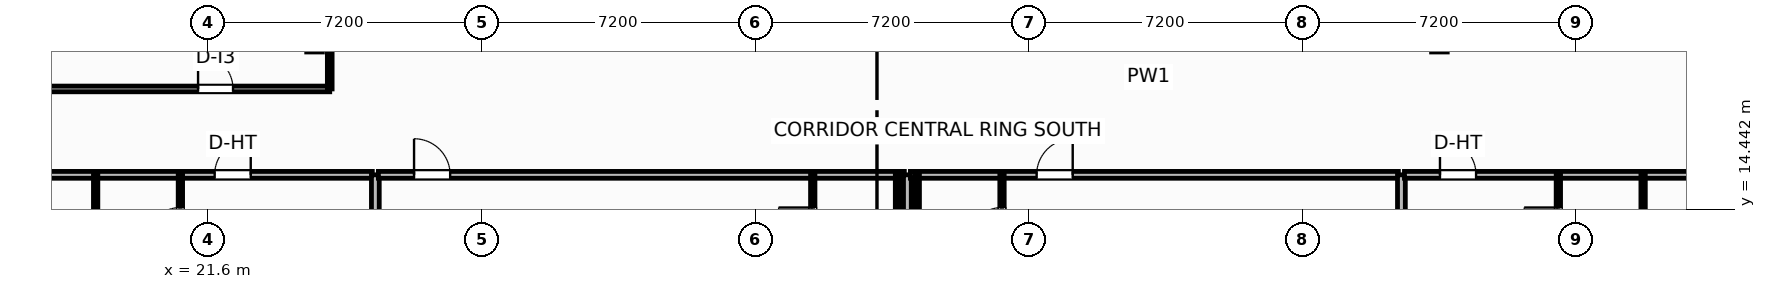
"""IFC4 building model, lengths in metres.
Left out: names, types, materials, properties, quantities, classifications, styles, units other than length and angle.
Written with IfcOpenShell. Run it as: python <this file> out.ifc"""

import sys

from ifc_helpers import new_model, si_unit, direction, frame, frame_2d, origin, place, context, subcontext, project, spatial, rectangle, extrude, element, fill, save


model = new_model("IFC4")
c1 = context("Model", 3, precision=1e-05, world=origin(), true_north=direction((0.0, 1.0)))
c2 = subcontext(c1, "Body", "Model", "MODEL_VIEW")
j1 = project(units=[si_unit("LENGTHUNIT", "METRE"), si_unit("PLANEANGLEUNIT", "RADIAN")], contexts=[c1])
p1 = place(None, origin())
s1 = spatial("IfcSite", under=j1, at=p1, CompositionType="ELEMENT")
p2 = place(p1, origin())
s2 = spatial("IfcBuilding", under=s1, at=p2, CompositionType="ELEMENT")
p3 = place(p2, frame((0.0, 0.0, 246.0)))
s3 = spatial("IfcBuildingStorey", under=s2, at=p3, CompositionType="ELEMENT", Elevation=246.0)
p4 = place(p3, frame((56.219, 9.845, 0.0), z_axis=(0.0, 0.0, 1.0), x_axis=(0.935225601791, 0.354052360188, 0.0)))
e1 = element("IfcWall", 1, at=p4, inside=s3, PredefinedType="SOLIDWALL", context=c2, shape_type="SweptSolid", body=[
    extrude(rectangle(XDim=17.647, YDim=0.22, at=frame_2d((8.824, 0.0))), origin(), (0.0, 0.0, 1.0), 2.73),
])
p5 = place(p4, frame((7.774, 0.0, 0.8)))
e2 = element("IfcOpeningElement", 2, at=p5, cuts=e1, PredefinedType="OPENING", context=c2, shape_type="SweptSolid", body=[
    extrude(rectangle(XDim=2.1, YDim=1.75, at=frame_2d((1.05, 0.875))), frame((0.0, 0.12, 0.0), z_axis=(0.0, -1.0, 0.0), x_axis=(1.0, 0.0, 0.0)), (0.0, 0.0, 1.0), 0.24),
])
p6 = place(p3, frame((6.908, 17.61, 0.0), z_axis=(0.0, 0.0, 1.0), x_axis=(1.0, 0.0, 0.0)))
e3 = element("IfcWall", 3, at=p6, inside=s3, PredefinedType="PARTITIONING", context=c2, shape_type="SweptSolid", body=[
    extrude(rectangle(XDim=17.892, YDim=0.15, at=frame_2d((8.946, 0.0))), origin(), (0.0, 0.0, 1.0), 3.45),
])
p7 = place(p6, frame((14.427, 0.0, 0.0)))
e4 = element("IfcOpeningElement", 4, at=p7, cuts=e3, PredefinedType="OPENING", context=c2, shape_type="SweptSolid", body=[
    extrude(rectangle(XDim=0.92, YDim=2.05, at=frame_2d((0.46, 1.025))), frame((0.0, 0.085, 0.0), z_axis=(0.0, -1.0, 0.0), x_axis=(1.0, 0.0, 0.0)), (0.0, 0.0, 1.0), 0.17),
])
p8 = place(p3, frame((24.8, 17.61, 0.0), z_axis=(0.0, 0.0, 1.0), x_axis=(0.0, 1.0, 0.0)))
e5 = element("IfcWall", 5, at=p8, inside=s3, PredefinedType="PARTITIONING", context=c2, shape_type="SweptSolid", body=[
    extrude(rectangle(XDim=1.63, YDim=0.125, at=frame_2d((0.815, 0.0))), origin(), (0.0, 0.0, 1.0), 2.739),
])
p9 = place(p3, frame((7.764, 15.35, 0.0), z_axis=(0.0, 0.0, 1.0), x_axis=(1.0, 0.0, 0.0)))
e6 = element("IfcWall", 6, at=p9, inside=s3, PredefinedType="PARTITIONING", context=c2, shape_type="SweptSolid", body=[
    extrude(rectangle(XDim=18.156, YDim=0.18, at=frame_2d((9.078, 0.0))), origin(), (0.0, 0.0, 1.0), 3.45),
])
p10 = place(p9, frame((14.007, 0.0, 0.0)))
e7 = element("IfcOpeningElement", 7, at=p10, cuts=e6, PredefinedType="OPENING", context=c2, shape_type="SweptSolid", body=[
    extrude(rectangle(XDim=0.95, YDim=2.15, at=frame_2d((0.475, 1.075))), frame((0.0, 0.1, 0.0), z_axis=(0.0, -1.0, 0.0), x_axis=(1.0, 0.0, 0.0)), (0.0, 0.0, 1.0), 0.2),
])
p11 = place(p3, frame((20.87, 12.83, 0.0), z_axis=(0.0, 0.0, 1.0), x_axis=(0.0, 1.0, 0.0)))
e8 = element("IfcWall", 8, at=p11, inside=s3, PredefinedType="PARTITIONING", context=c2, shape_type="SweptSolid", body=[
    extrude(rectangle(XDim=2.52, YDim=0.115, at=frame_2d((1.26, 0.0))), origin(), (0.0, 0.0, 1.0), 3.45),
])
p12 = place(p11, frame((0.76, 0.0, 0.0)))
e9 = element("IfcOpeningElement", 9, at=p12, cuts=e8, PredefinedType="OPENING", context=c2, shape_type="SweptSolid", body=[
    extrude(rectangle(XDim=0.9, YDim=2.05, at=frame_2d((0.45, 1.025))), frame((0.0, 0.067, 0.0), z_axis=(0.0, -1.0, 0.0), x_axis=(1.0, 0.0, 0.0)), (0.0, 0.0, 1.0), 0.135),
])
p13 = place(p3, frame((18.64, 12.83, 0.0), z_axis=(0.0, 0.0, 1.0), x_axis=(0.0, 1.0, 0.0)))
e10 = element("IfcWall", 10, at=p13, inside=s3, PredefinedType="PARTITIONING", context=c2, shape_type="SweptSolid", body=[
    extrude(rectangle(XDim=2.52, YDim=0.115, at=frame_2d((1.26, 0.0))), origin(), (0.0, 0.0, 1.0), 3.45),
])
p14 = place(p3, frame((26.0, -1.574, 0.0), z_axis=(0.0, 0.0, 1.0), x_axis=(0.0, 1.0, 0.0)))
e11 = element("IfcWall", 11, at=p14, inside=s3, PredefinedType="PARTITIONING", context=c2, shape_type="SweptSolid", body=[
    extrude(rectangle(XDim=16.925, YDim=0.205, at=frame_2d((8.462, 0.0))), origin(), (0.0, 0.0, 1.0), 2.739),
])
p15 = place(p3, frame((26.08, 15.35, 0.0), z_axis=(0.0, 0.0, 1.0), x_axis=(1.0, 0.0, 0.0)))
e12 = element("IfcWall", 12, at=p15, inside=s3, PredefinedType="PARTITIONING", context=c2, shape_type="SweptSolid", body=[
    extrude(rectangle(XDim=13.84, YDim=0.18, at=frame_2d((6.92, 0.0))), origin(), (0.0, 0.0, 1.0), 3.45),
])
p16 = place(p15, frame((0.939, 0.0, 0.0)))
e13 = element("IfcOpeningElement", 13, at=p16, cuts=e12, PredefinedType="OPENING", context=c2, shape_type="SweptSolid", body=[
    extrude(rectangle(XDim=0.95, YDim=2.15, at=frame_2d((0.475, 1.075))), frame((0.0, 0.1, 0.0), z_axis=(0.0, -1.0, 0.0), x_axis=(1.0, 0.0, 0.0)), (0.0, 0.0, 1.0), 0.2),
])
p17 = place(p3, frame((37.51, 12.83, 0.0), z_axis=(0.0, 0.0, 1.0), x_axis=(0.0, 1.0, 0.0)))
e14 = element("IfcWall", 14, at=p17, inside=s3, PredefinedType="PARTITIONING", context=c2, shape_type="SweptSolid", body=[
    extrude(rectangle(XDim=2.52, YDim=0.115, at=frame_2d((1.26, 0.0))), origin(), (0.0, 0.0, 1.0), 3.45),
])
p18 = place(p17, frame((0.76, 0.0, 0.0)))
e15 = element("IfcOpeningElement", 15, at=p18, cuts=e14, PredefinedType="OPENING", context=c2, shape_type="SweptSolid", body=[
    extrude(rectangle(XDim=0.9, YDim=2.05, at=frame_2d((0.45, 1.025))), frame((0.0, 0.067, 0.0), z_axis=(0.0, -1.0, 0.0), x_axis=(1.0, 0.0, 0.0)), (0.0, 0.0, 1.0), 0.135),
])
p19 = place(p3, frame((39.74, 12.83, 0.0), z_axis=(0.0, 0.0, 1.0), x_axis=(0.0, 1.0, 0.0)))
e16 = element("IfcWall", 16, at=p19, inside=s3, PredefinedType="PARTITIONING", context=c2, shape_type="SweptSolid", body=[
    extrude(rectangle(XDim=2.52, YDim=0.115, at=frame_2d((1.26, 0.0))), origin(), (0.0, 0.0, 1.0), 3.45),
])
p20 = place(p3, frame((40.0, 5.971, 0.0), z_axis=(0.0, 0.0, 1.0), x_axis=(0.0, 1.0, 0.0)))
e17 = element("IfcWall", 17, at=p20, inside=s3, PredefinedType="PARTITIONING", context=c2, shape_type="SweptSolid", body=[
    extrude(rectangle(XDim=9.379, YDim=0.205, at=frame_2d((4.689, 0.0))), origin(), (0.0, 0.0, 1.0), 3.45),
])
p21 = place(p3, frame((40.08, 15.35, 0.0), z_axis=(0.0, 0.0, 1.0), x_axis=(1.0, 0.0, 0.0)))
e18 = element("IfcWall", 18, at=p21, inside=s3, PredefinedType="PARTITIONING", context=c2, shape_type="SweptSolid", body=[
    extrude(rectangle(XDim=12.84, YDim=0.18, at=frame_2d((6.42, 0.0))), origin(), (0.0, 0.0, 1.0), 3.45),
])
p22 = place(p21, frame((3.321, 0.0, 0.0)))
e19 = element("IfcOpeningElement", 19, at=p22, cuts=e18, PredefinedType="OPENING", context=c2, shape_type="SweptSolid", body=[
    extrude(rectangle(XDim=0.95, YDim=2.15, at=frame_2d((0.475, 1.075))), frame((0.0, 0.1, 0.0), z_axis=(0.0, -1.0, 0.0), x_axis=(1.0, 0.0, 0.0)), (0.0, 0.0, 1.0), 0.2),
])
p23 = place(p3, frame((42.49, 12.83, 0.0), z_axis=(0.0, 0.0, 1.0), x_axis=(0.0, 1.0, 0.0)))
e20 = element("IfcWall", 20, at=p23, inside=s3, PredefinedType="PARTITIONING", context=c2, shape_type="SweptSolid", body=[
    extrude(rectangle(XDim=2.52, YDim=0.115, at=frame_2d((1.26, 0.0))), origin(), (0.0, 0.0, 1.0), 3.45),
])
p24 = place(p23, frame((0.76, 0.0, 0.0)))
e21 = element("IfcOpeningElement", 21, at=p24, cuts=e20, PredefinedType="OPENING", context=c2, shape_type="SweptSolid", body=[
    extrude(rectangle(XDim=0.9, YDim=2.05, at=frame_2d((0.45, 1.025))), frame((0.0, 0.067, 0.0), z_axis=(0.0, -1.0, 0.0), x_axis=(1.0, 0.0, 0.0)), (0.0, 0.0, 1.0), 0.135),
])
p25 = place(p3, frame((40.26, 12.83, 0.0), z_axis=(0.0, 0.0, 1.0), x_axis=(0.0, 1.0, 0.0)))
e22 = element("IfcWall", 22, at=p25, inside=s3, PredefinedType="PARTITIONING", context=c2, shape_type="SweptSolid", body=[
    extrude(rectangle(XDim=2.52, YDim=0.115, at=frame_2d((1.26, 0.0))), origin(), (0.0, 0.0, 1.0), 3.45),
])
p26 = place(p3, frame((53.0, 10.893, 0.0), z_axis=(0.0, 0.0, 1.0), x_axis=(0.0, 1.0, 0.0)))
e23 = element("IfcWall", 23, at=p26, inside=s3, PredefinedType="PARTITIONING", context=c2, shape_type="SweptSolid", body=[
    extrude(rectangle(XDim=4.457, YDim=0.205, at=frame_2d((2.229, 0.0))), origin(), (0.0, 0.0, 1.0), 3.45),
])
p27 = place(p3, frame((53.08, 15.35, 0.0), z_axis=(0.0, 0.0, 1.0), x_axis=(1.0, 0.0, 0.0)))
e24 = element("IfcWall", 24, at=p27, inside=s3, PredefinedType="PARTITIONING", context=c2, shape_type="SweptSolid", body=[
    extrude(rectangle(XDim=17.624, YDim=0.18, at=frame_2d((8.812, 0.0))), origin(), (0.0, 0.0, 1.0), 3.45),
])
p28 = place(p27, frame((0.935, 0.0, 0.0)))
e25 = element("IfcOpeningElement", 25, at=p28, cuts=e24, PredefinedType="OPENING", context=c2, shape_type="SweptSolid", body=[
    extrude(rectangle(XDim=0.95, YDim=2.15, at=frame_2d((0.475, 1.075))), frame((0.0, 0.1, 0.0), z_axis=(0.0, -1.0, 0.0), x_axis=(1.0, 0.0, 0.0)), (0.0, 0.0, 1.0), 0.2),
])
p29 = place(p3, frame((57.13, 12.83, 0.0), z_axis=(0.0, 0.0, 1.0), x_axis=(0.0, 1.0, 0.0)))
e26 = element("IfcWall", 26, at=p29, inside=s3, PredefinedType="PARTITIONING", context=c2, shape_type="SweptSolid", body=[
    extrude(rectangle(XDim=2.52, YDim=0.115, at=frame_2d((1.26, 0.0))), origin(), (0.0, 0.0, 1.0), 3.45),
])
p30 = place(p29, frame((0.76, 0.0, 0.0)))
e27 = element("IfcOpeningElement", 27, at=p30, cuts=e26, PredefinedType="OPENING", context=c2, shape_type="SweptSolid", body=[
    extrude(rectangle(XDim=0.9, YDim=2.05, at=frame_2d((0.45, 1.025))), frame((0.0, 0.067, 0.0), z_axis=(0.0, -1.0, 0.0), x_axis=(1.0, 0.0, 0.0)), (0.0, 0.0, 1.0), 0.135),
])
p31 = place(p3, frame((59.36, 12.83, 0.0), z_axis=(0.0, 0.0, 1.0), x_axis=(0.0, 1.0, 0.0)))
e28 = element("IfcWall", 28, at=p31, inside=s3, PredefinedType="PARTITIONING", context=c2, shape_type="SweptSolid", body=[
    extrude(rectangle(XDim=2.52, YDim=0.115, at=frame_2d((1.26, 0.0))), origin(), (0.0, 0.0, 1.0), 3.45),
])
p32 = place(p7, origin())
e29 = element("IfcDoor", 29, at=p32, inside=s3, OperationType="SINGLE_SWING_LEFT", PredefinedType="DOOR", context=c2, shape_type="SweptSolid", body=[
    extrude(rectangle(XDim=0.92, YDim=2.05, at=frame_2d((0.46, 1.025))), frame((0.0, 0.025, 0.0), z_axis=(0.0, -1.0, 0.0), x_axis=(1.0, 0.0, 0.0)), (0.0, 0.0, 1.0), 0.05),
])
fill(e4, e29)
p33 = place(p10, origin())
e30 = element("IfcDoor", 30, at=p33, inside=s3, OperationType="SINGLE_SWING_RIGHT", PredefinedType="DOOR", context=c2, shape_type="SweptSolid", body=[
    extrude(rectangle(XDim=0.95, YDim=2.15, at=frame_2d((0.475, 1.075))), frame((0.0, 0.025, 0.0), z_axis=(0.0, -1.0, 0.0), x_axis=(1.0, 0.0, 0.0)), (0.0, 0.0, 1.0), 0.05),
])
fill(e7, e30)
p34 = place(p12, origin())
e31 = element("IfcDoor", 31, at=p34, inside=s3, OperationType="SINGLE_SWING_LEFT", PredefinedType="DOOR", context=c2, shape_type="SweptSolid", body=[
    extrude(rectangle(XDim=0.9, YDim=2.05, at=frame_2d((0.45, 1.025))), frame((0.0, 0.025, 0.0), z_axis=(0.0, -1.0, 0.0), x_axis=(1.0, 0.0, 0.0)), (0.0, 0.0, 1.0), 0.05),
])
fill(e9, e31)
p35 = place(p16, origin())
e32 = element("IfcDoor", 32, at=p35, inside=s3, OperationType="SINGLE_SWING_LEFT", PredefinedType="DOOR", context=c2, shape_type="SweptSolid", body=[
    extrude(rectangle(XDim=0.95, YDim=2.15, at=frame_2d((0.475, 1.075))), frame((0.0, 0.025, 0.0), z_axis=(0.0, -1.0, 0.0), x_axis=(1.0, 0.0, 0.0)), (0.0, 0.0, 1.0), 0.05),
])
fill(e13, e32)
p36 = place(p18, origin())
e33 = element("IfcDoor", 33, at=p36, inside=s3, OperationType="SINGLE_SWING_RIGHT", PredefinedType="DOOR", context=c2, shape_type="SweptSolid", body=[
    extrude(rectangle(XDim=0.9, YDim=2.05, at=frame_2d((0.45, 1.025))), frame((0.0, 0.025, 0.0), z_axis=(0.0, -1.0, 0.0), x_axis=(1.0, 0.0, 0.0)), (0.0, 0.0, 1.0), 0.05),
])
fill(e15, e33)
p37 = place(p22, origin())
e34 = element("IfcDoor", 34, at=p37, inside=s3, OperationType="SINGLE_SWING_RIGHT", PredefinedType="DOOR", context=c2, shape_type="SweptSolid", body=[
    extrude(rectangle(XDim=0.95, YDim=2.15, at=frame_2d((0.475, 1.075))), frame((0.0, 0.025, 0.0), z_axis=(0.0, -1.0, 0.0), x_axis=(1.0, 0.0, 0.0)), (0.0, 0.0, 1.0), 0.05),
])
fill(e19, e34)
p38 = place(p24, origin())
e35 = element("IfcDoor", 35, at=p38, inside=s3, OperationType="SINGLE_SWING_LEFT", PredefinedType="DOOR", context=c2, shape_type="SweptSolid", body=[
    extrude(rectangle(XDim=0.9, YDim=2.05, at=frame_2d((0.45, 1.025))), frame((0.0, 0.025, 0.0), z_axis=(0.0, -1.0, 0.0), x_axis=(1.0, 0.0, 0.0)), (0.0, 0.0, 1.0), 0.05),
])
fill(e21, e35)
p39 = place(p28, origin())
e36 = element("IfcDoor", 36, at=p39, inside=s3, OperationType="SINGLE_SWING_LEFT", PredefinedType="DOOR", context=c2, shape_type="SweptSolid", body=[
    extrude(rectangle(XDim=0.95, YDim=2.15, at=frame_2d((0.475, 1.075))), frame((0.0, 0.025, 0.0), z_axis=(0.0, -1.0, 0.0), x_axis=(1.0, 0.0, 0.0)), (0.0, 0.0, 1.0), 0.05),
])
fill(e25, e36)
p40 = place(p30, origin())
e37 = element("IfcDoor", 37, at=p40, inside=s3, OperationType="SINGLE_SWING_RIGHT", PredefinedType="DOOR", context=c2, shape_type="SweptSolid", body=[
    extrude(rectangle(XDim=0.9, YDim=2.05, at=frame_2d((0.45, 1.025))), frame((0.0, 0.025, 0.0), z_axis=(0.0, -1.0, 0.0), x_axis=(1.0, 0.0, 0.0)), (0.0, 0.0, 1.0), 0.05),
])
fill(e27, e37)
save(model, sys.argv[1])
